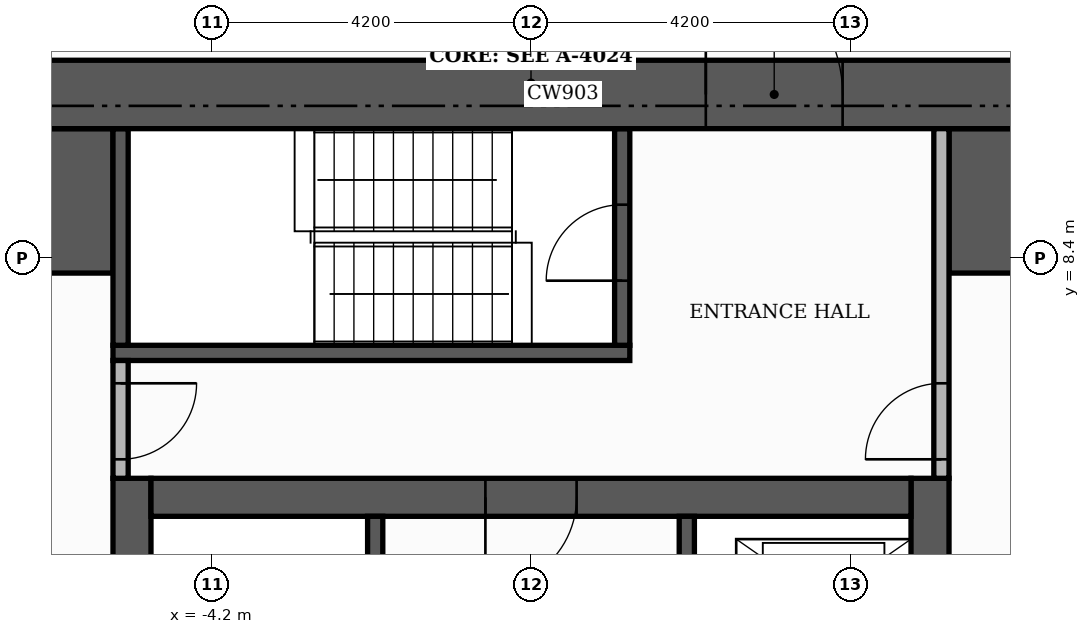
"""IFC4 building model, lengths in metres.
Left out: names, types, materials, properties, quantities, classifications, styles, units other than length and angle.
Written with IfcOpenShell. Run it as: python <this file> out.ifc"""

import sys

from ifc_helpers import new_model, si_unit, direction, frame, frame_2d, origin, place, context, subcontext, project, spatial, rectangle, extrude, element, fill, save


model = new_model("IFC4")
c1 = context("Model", 3, precision=1e-05, world=origin(), true_north=direction((0.0, 1.0)))
c2 = subcontext(c1, "Body", "Model", "MODEL_VIEW")
j1 = project(units=[si_unit("LENGTHUNIT", "METRE"), si_unit("PLANEANGLEUNIT", "RADIAN")], contexts=[c1])
p1 = place(None, origin())
s1 = spatial("IfcSite", under=j1, at=p1, CompositionType="ELEMENT")
p2 = place(p1, origin())
s2 = spatial("IfcBuilding", under=s1, at=p2, CompositionType="ELEMENT")
p3 = place(p2, frame((0.0, 0.0, 145.5)))
s3 = spatial("IfcBuildingStorey", under=s2, at=p3, CompositionType="ELEMENT", Elevation=145.5)
for number, where, z_axis, x_axis in (
    (1, (-5.25, -5.0, 0.0), (0.0, 0.0, 1.0), (0.0, 1.0, 0.0)),
    (2, (5.25, -5.0, 0.0), (0.0, 0.0, 1.0), (0.0, 1.0, 0.0)),
):
    element("IfcWall", number, at=place(p3, frame(where, z_axis=z_axis, x_axis=x_axis)), inside=s3, PredefinedType="SHEAR", context=c2, shape_type="SweptSolid", body=[
        extrude(rectangle(XDim=10.5, YDim=0.5, at=frame_2d((5.25, 0.0))), origin(), (0.0, 0.0, 1.0), 3.48),
    ])
p4 = place(p3, frame((-5.0, 5.25, 0.0), z_axis=(0.0, 0.0, 1.0), x_axis=(1.0, 0.0, 0.0)))
e3 = element("IfcWall", 3, at=p4, inside=s3, PredefinedType="SHEAR", context=c2, shape_type="SweptSolid", body=[
    extrude(rectangle(XDim=10.0, YDim=0.5, at=frame_2d((5.0, 0.0))), origin(), (0.0, 0.0, 1.0), 3.48),
])
p5 = place(p4, frame((4.4, 0.0, 0.0)))
e4 = element("IfcOpeningElement", 4, at=p5, cuts=e3, PredefinedType="OPENING", context=c2, shape_type="SweptSolid", body=[
    extrude(rectangle(XDim=1.2, YDim=2.1, at=frame_2d((0.6, 1.05))), frame((0.0, 0.26, 0.0), z_axis=(0.0, -1.0, 0.0), x_axis=(1.0, 0.0, 0.0)), (0.0, 0.0, 1.0), 0.52),
])
for number, where, z_axis, x_axis in (
    (5, (-10.1, 9.15, 0.0), (0.0, 0.0, 1.0), (1.0, 0.0, 0.0)),
    (6, (5.5, 9.15, 0.0), (0.0, 0.0, 1.0), (1.0, 0.0, 0.0)),
):
    element("IfcWall", number, at=place(p3, frame(where, z_axis=z_axis, x_axis=x_axis)), inside=s3, PredefinedType="SHEAR", context=c2, shape_type="SweptSolid", body=[
        extrude(rectangle(XDim=4.6, YDim=1.9, at=frame_2d((2.3, 0.0))), origin(), (0.0, 0.0, 1.0), 3.48),
    ])
p6 = place(p3, frame((-2.05, -1.4, 0.0), z_axis=(0.0, 0.0, 1.0), x_axis=(0.0, 1.0, 0.0)))
e7 = element("IfcWall", 7, at=p6, inside=s3, PredefinedType="SHEAR", context=c2, shape_type="SweptSolid", body=[
    extrude(rectangle(XDim=6.4, YDim=0.2, at=frame_2d((3.2, 0.0))), origin(), (0.0, 0.0, 1.0), 3.48),
])
p7 = place(p6, frame((0.15, 0.0, 0.0)))
e8 = element("IfcOpeningElement", 8, at=p7, cuts=e7, PredefinedType="OPENING", context=c2, shape_type="SweptSolid", body=[
    extrude(rectangle(XDim=1.0, YDim=2.1, at=frame_2d((0.5, 1.05))), frame((0.0, 0.11, 0.0), z_axis=(0.0, -1.0, 0.0), x_axis=(1.0, 0.0, 0.0)), (0.0, 0.0, 1.0), 0.22),
])
p8 = place(p3, frame((-5.5, 7.15, 0.0), z_axis=(0.0, 0.0, 1.0), x_axis=(1.0, 0.0, 0.0)))
e9 = element("IfcWall", 9, at=p8, inside=s3, PredefinedType="SHEAR", context=c2, shape_type="SweptSolid", body=[
    extrude(rectangle(XDim=6.8, YDim=0.2, at=frame_2d((3.4, 0.0))), origin(), (0.0, 0.0, 1.0), 3.48),
])
p9 = place(p3, frame((-5.4, 7.25, 0.0), z_axis=(0.0, 0.0, 1.0), x_axis=(0.0, 1.0, 0.0)))
e10 = element("IfcWall", 10, at=p9, inside=s3, PredefinedType="SHEAR", context=c2, shape_type="SweptSolid", body=[
    extrude(rectangle(XDim=2.85, YDim=0.2, at=frame_2d((1.425, 0.0))), origin(), (0.0, 0.0, 1.0), 3.48),
])
p10 = place(p3, frame((1.2, 7.25, 0.0), z_axis=(0.0, 0.0, 1.0), x_axis=(0.0, 1.0, 0.0)))
e11 = element("IfcWall", 11, at=p10, inside=s3, PredefinedType="SHEAR", context=c2, shape_type="SweptSolid", body=[
    extrude(rectangle(XDim=2.85, YDim=0.2, at=frame_2d((1.425, 0.0))), origin(), (0.0, 0.0, 1.0), 3.48),
])
p11 = place(p10, frame((0.85, 0.0, 0.0)))
e12 = element("IfcOpeningElement", 12, at=p11, cuts=e11, PredefinedType="OPENING", context=c2, shape_type="SweptSolid", body=[
    extrude(rectangle(XDim=1.0, YDim=2.1, at=frame_2d((0.5, 1.05))), frame((0.0, 0.11, 0.0), z_axis=(0.0, -1.0, 0.0), x_axis=(1.0, 0.0, 0.0)), (0.0, 0.0, 1.0), 0.22),
])
p12 = place(p3, frame((2.05, 1.6, 0.0), z_axis=(0.0, 0.0, 1.0), x_axis=(0.0, 1.0, 0.0)))
e13 = element("IfcWall", 13, at=p12, inside=s3, PredefinedType="SHEAR", context=c2, shape_type="SweptSolid", body=[
    extrude(rectangle(XDim=3.4, YDim=0.2, at=frame_2d((1.7, 0.0))), origin(), (0.0, 0.0, 1.0), 3.48),
])
p13 = place(p12, frame((1.75, 0.0, 0.0)))
e14 = element("IfcOpeningElement", 14, at=p13, cuts=e13, PredefinedType="OPENING", context=c2, shape_type="SweptSolid", body=[
    extrude(rectangle(XDim=1.1, YDim=2.1, at=frame_2d((0.55, 1.05))), frame((0.0, 0.11, 0.0), z_axis=(0.0, -1.0, 0.0), x_axis=(1.0, 0.0, 0.0)), (0.0, 0.0, 1.0), 0.22),
])
p14 = place(p12, frame((0.15, 0.0, 0.0)))
e15 = element("IfcOpeningElement", 15, at=p14, cuts=e13, PredefinedType="OPENING", context=c2, shape_type="SweptSolid", body=[
    extrude(rectangle(XDim=0.8, YDim=2.1, at=frame_2d((0.4, 1.05))), frame((0.0, 0.11, 0.0), z_axis=(0.0, -1.0, 0.0), x_axis=(1.0, 0.0, 0.0)), (0.0, 0.0, 1.0), 0.22),
])
p15 = place(p3, frame((-11.0, 10.55, 0.0), z_axis=(0.0, 0.0, 1.0), x_axis=(1.0, 0.0, 0.0)))
e16 = element("IfcWall", 16, at=p15, inside=s3, PredefinedType="SHEAR", context=c2, shape_type="SweptSolid", body=[
    extrude(rectangle(XDim=22.0, YDim=0.9, at=frame_2d((11.0, 0.0))), origin(), (0.0, 0.0, 1.0), 3.48),
])
p16 = place(p15, frame((13.3, 0.0, 0.0)))
e17 = element("IfcOpeningElement", 17, at=p16, cuts=e16, PredefinedType="OPENING", context=c2, shape_type="SweptSolid", body=[
    extrude(rectangle(XDim=1.8, YDim=2.2, at=frame_2d((0.9, 1.1))), frame((0.0, 0.46, 0.0), z_axis=(0.0, -1.0, 0.0), x_axis=(1.0, 0.0, 0.0)), (0.0, 0.0, 1.0), 0.92),
])
p17 = place(p3, frame((-5.4, 5.5, 0.0), z_axis=(0.0, 0.0, 1.0), x_axis=(0.0, 1.0, 0.0)))
e18 = element("IfcWall", 18, at=p17, inside=s3, PredefinedType="PARTITIONING", context=c2, shape_type="SweptSolid", body=[
    extrude(rectangle(XDim=1.55, YDim=0.2, at=frame_2d((0.775, 0.0))), origin(), (0.0, 0.0, 1.0), 3.48),
])
p18 = place(p17, frame((0.25, 0.0, 0.0)))
e19 = element("IfcOpeningElement", 19, at=p18, cuts=e18, PredefinedType="OPENING", context=c2, shape_type="SweptSolid", body=[
    extrude(rectangle(XDim=1.0, YDim=2.1, at=frame_2d((0.5, 1.05))), frame((0.0, 0.11, 0.0), z_axis=(0.0, -1.0, 0.0), x_axis=(1.0, 0.0, 0.0)), (0.0, 0.0, 1.0), 0.22),
])
p19 = place(p3, frame((5.4, 5.5, 0.0), z_axis=(0.0, 0.0, 1.0), x_axis=(0.0, 1.0, 0.0)))
e20 = element("IfcWall", 20, at=p19, inside=s3, PredefinedType="PARTITIONING", context=c2, shape_type="SweptSolid", body=[
    extrude(rectangle(XDim=4.6, YDim=0.2, at=frame_2d((2.3, 0.0))), origin(), (0.0, 0.0, 1.0), 3.48),
])
p20 = place(p19, frame((0.25, 0.0, 0.0)))
e21 = element("IfcOpeningElement", 21, at=p20, cuts=e20, PredefinedType="OPENING", context=c2, shape_type="SweptSolid", body=[
    extrude(rectangle(XDim=1.0, YDim=2.1, at=frame_2d((0.5, 1.05))), frame((0.0, 0.11, 0.0), z_axis=(0.0, -1.0, 0.0), x_axis=(1.0, 0.0, 0.0)), (0.0, 0.0, 1.0), 0.22),
])
p21 = place(p5, frame((1.2, 0.0, 0.0), z_axis=(0.0, 0.0, 1.0), x_axis=(-1.0, 0.0, 0.0)))
e22 = element("IfcDoor", 22, at=p21, inside=s3, OperationType="SINGLE_SWING_LEFT", PredefinedType="DOOR", context=c2, shape_type="SweptSolid", body=[
    extrude(rectangle(XDim=1.2, YDim=2.1, at=frame_2d((0.6, 1.05))), frame((0.0, 0.025, 0.0), z_axis=(0.0, -1.0, 0.0), x_axis=(1.0, 0.0, 0.0)), (0.0, 0.0, 1.0), 0.05),
])
fill(e4, e22)
p22 = place(p11, origin())
e23 = element("IfcDoor", 23, at=p22, inside=s3, OperationType="SINGLE_SWING_LEFT", PredefinedType="DOOR", context=c2, shape_type="SweptSolid", body=[
    extrude(rectangle(XDim=1.0, YDim=2.1, at=frame_2d((0.5, 1.05))), frame((0.0, 0.025, 0.0), z_axis=(0.0, -1.0, 0.0), x_axis=(1.0, 0.0, 0.0)), (0.0, 0.0, 1.0), 0.05),
])
fill(e12, e23)
p23 = place(p18, frame((1.0, 0.0, 0.0), z_axis=(0.0, 0.0, 1.0), x_axis=(-1.0, 0.0, 0.0)))
e24 = element("IfcDoor", 24, at=p23, inside=s3, OperationType="SINGLE_SWING_RIGHT", PredefinedType="DOOR", context=c2, shape_type="SweptSolid", body=[
    extrude(rectangle(XDim=1.0, YDim=2.1, at=frame_2d((0.5, 1.05))), frame((0.0, 0.025, 0.0), z_axis=(0.0, -1.0, 0.0), x_axis=(1.0, 0.0, 0.0)), (0.0, 0.0, 1.0), 0.05),
])
fill(e19, e24)
p24 = place(p20, origin())
e25 = element("IfcDoor", 25, at=p24, inside=s3, OperationType="SINGLE_SWING_LEFT", PredefinedType="DOOR", context=c2, shape_type="SweptSolid", body=[
    extrude(rectangle(XDim=1.0, YDim=2.1, at=frame_2d((0.5, 1.05))), frame((0.0, 0.025, 0.0), z_axis=(0.0, -1.0, 0.0), x_axis=(1.0, 0.0, 0.0)), (0.0, 0.0, 1.0), 0.05),
])
fill(e21, e25)
p25 = place(p16, origin())
e26 = element("IfcDoor", 26, at=p25, inside=s3, OperationType="DOUBLE_DOOR_SINGLE_SWING", PredefinedType="DOOR", context=c2, shape_type="SweptSolid", body=[
    extrude(rectangle(XDim=1.8, YDim=2.2, at=frame_2d((0.9, 1.1))), frame((0.0, 0.025, 0.0), z_axis=(0.0, -1.0, 0.0), x_axis=(1.0, 0.0, 0.0)), (0.0, 0.0, 1.0), 0.05),
])
fill(e17, e26)
save(model, sys.argv[1])
